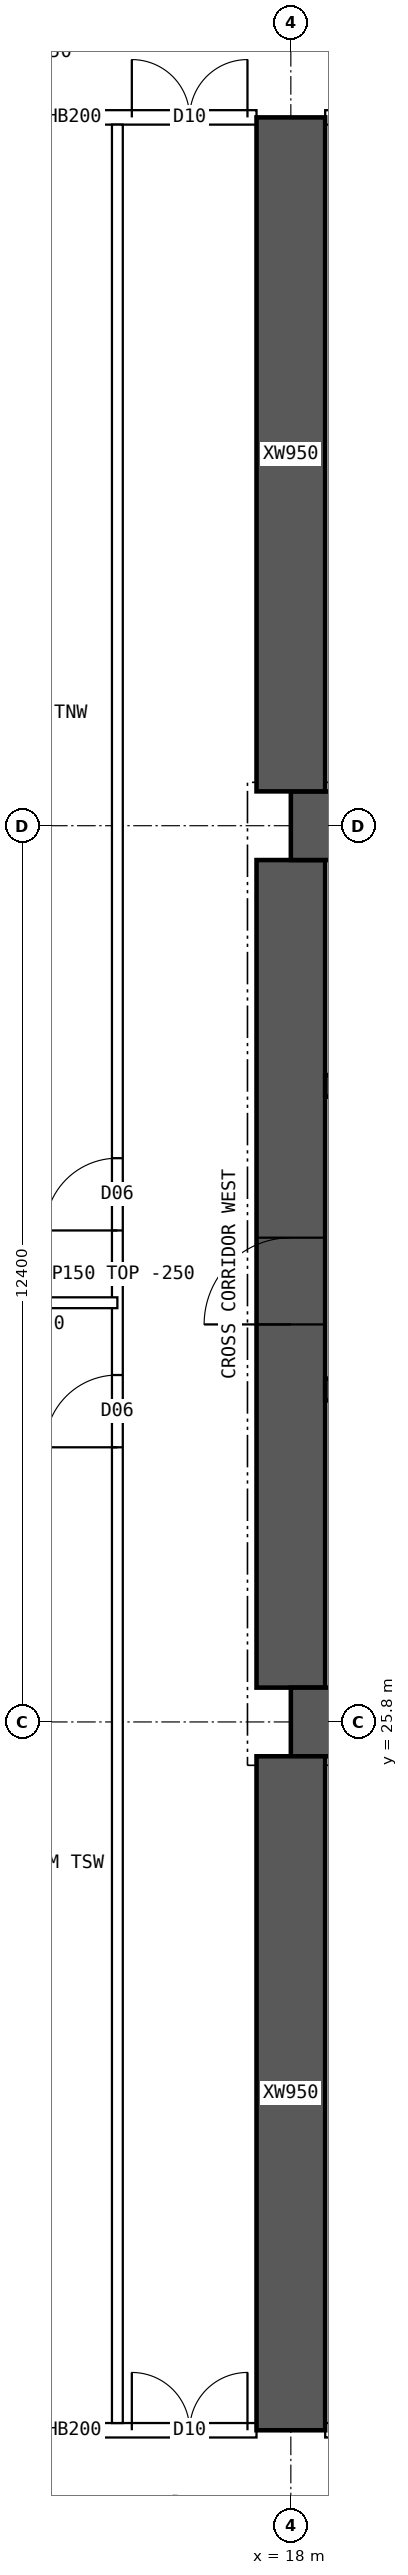
"""IFC4 building model, lengths in metres.
Left out: names, types, materials, properties, quantities, classifications, styles, units other than length and angle.
Written with IfcOpenShell. Run it as: python <this file> out.ifc"""

import sys

from ifc_helpers import new_model, si_unit, direction, frame, frame_2d, origin, place, context, subcontext, project, spatial, rectangle, extrude, element, fill, save


model = new_model("IFC4")
c1 = context("Model", 3, precision=1e-05, world=origin(), true_north=direction((0.0, 1.0)))
c2 = subcontext(c1, "Body", "Model", "MODEL_VIEW")
j1 = project(units=[si_unit("LENGTHUNIT", "METRE"), si_unit("PLANEANGLEUNIT", "RADIAN")], contexts=[c1])
p1 = place(None, origin())
s1 = spatial("IfcSite", under=j1, at=p1, CompositionType="ELEMENT")
p2 = place(p1, origin())
s2 = spatial("IfcBuilding", under=s1, at=p2, CompositionType="ELEMENT")
p3 = place(p2, frame((0.0, 0.0, 121.9)))
s3 = spatial("IfcBuildingStorey", under=s2, at=p3, CompositionType="ELEMENT", Elevation=121.9)
for number, where, z_axis, x_axis in (
    (1, (18.0, 25.8, 0.0), (0.0, 0.0, 1.0), (1.0, 0.0, 0.0)),
    (2, (18.0, 38.2, 0.0), (0.0, 0.0, 1.0), (1.0, 0.0, 0.0)),
):
    element("IfcWall", number, at=place(p3, frame(where, z_axis=z_axis, x_axis=x_axis)), inside=s3, PredefinedType="SHEAR", context=c2, shape_type="SweptSolid", body=[
        extrude(rectangle(XDim=48.0, YDim=0.95, at=frame_2d((24.0, 0.0))), origin(), (0.0, 0.0, 1.0), 3.75),
    ])
p4 = place(p3, frame((18.0, 26.275, 0.0), z_axis=(0.0, 0.0, 1.0), x_axis=(0.0, 1.0, 0.0)))
e3 = element("IfcWall", 3, at=p4, inside=s3, PredefinedType="SHEAR", context=c2, shape_type="SweptSolid", body=[
    extrude(rectangle(XDim=11.45, YDim=0.95, at=frame_2d((5.725, 0.0))), origin(), (0.0, 0.0, 1.0), 3.75),
])
p5 = place(p4, frame((5.025, 0.0, 0.0)))
e4 = element("IfcOpeningElement", 4, at=p5, cuts=e3, PredefinedType="OPENING", context=c2, shape_type="SweptSolid", body=[
    extrude(rectangle(XDim=1.2, YDim=2.1, at=frame_2d((0.6, 1.05))), frame((0.0, 0.485, 0.0), z_axis=(0.0, -1.0, 0.0), x_axis=(1.0, 0.0, 0.0)), (0.0, 0.0, 1.0), 0.97),
])
p6 = place(p3, frame((18.475, 30.4, 0.0), z_axis=(0.0, 0.0, 1.0), x_axis=(1.0, 0.0, 0.0)))
e5 = element("IfcWall", 5, at=p6, inside=s3, PredefinedType="SHEAR", context=c2, shape_type="SweptSolid", body=[
    extrude(rectangle(XDim=47.05, YDim=0.3, at=frame_2d((23.525, 0.0))), origin(), (0.0, 0.0, 1.0), 3.75),
])
p7 = place(p6, frame((0.4, 0.0, 0.0)))
e6 = element("IfcOpeningElement", 6, at=p7, cuts=e5, PredefinedType="OPENING", context=c2, shape_type="SweptSolid", body=[
    extrude(rectangle(XDim=1.0, YDim=2.1, at=frame_2d((0.5, 1.05))), frame((0.0, 0.16, 0.0), z_axis=(0.0, -1.0, 0.0), x_axis=(1.0, 0.0, 0.0)), (0.0, 0.0, 1.0), 0.32),
])
p8 = place(p6, frame((45.65, 0.0, 0.0)))
e7 = element("IfcOpeningElement", 7, at=p8, cuts=e5, PredefinedType="OPENING", context=c2, shape_type="SweptSolid", body=[
    extrude(rectangle(XDim=1.0, YDim=2.1, at=frame_2d((0.5, 1.05))), frame((0.0, 0.16, 0.0), z_axis=(0.0, -1.0, 0.0), x_axis=(1.0, 0.0, 0.0)), (0.0, 0.0, 1.0), 0.32),
])
p9 = place(p6, frame((8.275, 0.0, 0.0)))
e8 = element("IfcOpeningElement", 8, at=p9, cuts=e5, PredefinedType="OPENING", context=c2, shape_type="SweptSolid", body=[
    extrude(rectangle(XDim=1.1, YDim=2.1, at=frame_2d((0.55, 1.05))), frame((0.0, 0.16, 0.0), z_axis=(0.0, -1.0, 0.0), x_axis=(1.0, 0.0, 0.0)), (0.0, 0.0, 1.0), 0.32),
])
p10 = place(p6, frame((10.875, 0.0, 0.0)))
e9 = element("IfcOpeningElement", 9, at=p10, cuts=e5, PredefinedType="OPENING", context=c2, shape_type="SweptSolid", body=[
    extrude(rectangle(XDim=1.1, YDim=2.1, at=frame_2d((0.55, 1.05))), frame((0.0, 0.16, 0.0), z_axis=(0.0, -1.0, 0.0), x_axis=(1.0, 0.0, 0.0)), (0.0, 0.0, 1.0), 0.32),
])
p11 = place(p6, frame((13.475, 0.0, 0.0)))
e10 = element("IfcOpeningElement", 10, at=p11, cuts=e5, PredefinedType="OPENING", context=c2, shape_type="SweptSolid", body=[
    extrude(rectangle(XDim=1.1, YDim=2.1, at=frame_2d((0.55, 1.05))), frame((0.0, 0.16, 0.0), z_axis=(0.0, -1.0, 0.0), x_axis=(1.0, 0.0, 0.0)), (0.0, 0.0, 1.0), 0.32),
])
p12 = place(p6, frame((16.075, 0.0, 0.0)))
e11 = element("IfcOpeningElement", 11, at=p12, cuts=e5, PredefinedType="OPENING", context=c2, shape_type="SweptSolid", body=[
    extrude(rectangle(XDim=1.1, YDim=2.1, at=frame_2d((0.55, 1.05))), frame((0.0, 0.16, 0.0), z_axis=(0.0, -1.0, 0.0), x_axis=(1.0, 0.0, 0.0)), (0.0, 0.0, 1.0), 0.32),
])
p13 = place(p6, frame((18.85, 0.0, 0.0)))
e12 = element("IfcOpeningElement", 12, at=p13, cuts=e5, PredefinedType="OPENING", context=c2, shape_type="SweptSolid", body=[
    extrude(rectangle(XDim=0.9, YDim=2.1, at=frame_2d((0.45, 1.05))), frame((0.0, 0.16, 0.0), z_axis=(0.0, -1.0, 0.0), x_axis=(1.0, 0.0, 0.0)), (0.0, 0.0, 1.0), 0.32),
])
p14 = place(p6, frame((30.142, 0.0, 0.0)))
e13 = element("IfcOpeningElement", 13, at=p14, cuts=e5, PredefinedType="OPENING", context=c2, shape_type="SweptSolid", body=[
    extrude(rectangle(XDim=1.1, YDim=2.1, at=frame_2d((0.55, 1.05))), frame((0.0, 0.16, 0.0), z_axis=(0.0, -1.0, 0.0), x_axis=(1.0, 0.0, 0.0)), (0.0, 0.0, 1.0), 0.32),
])
p15 = place(p6, frame((33.675, 0.0, 0.0)))
e14 = element("IfcOpeningElement", 14, at=p15, cuts=e5, PredefinedType="OPENING", context=c2, shape_type="SweptSolid", body=[
    extrude(rectangle(XDim=1.1, YDim=2.1, at=frame_2d((0.55, 1.05))), frame((0.0, 0.16, 0.0), z_axis=(0.0, -1.0, 0.0), x_axis=(1.0, 0.0, 0.0)), (0.0, 0.0, 1.0), 0.32),
])
p16 = place(p6, frame((37.208, 0.0, 0.0)))
e15 = element("IfcOpeningElement", 15, at=p16, cuts=e5, PredefinedType="OPENING", context=c2, shape_type="SweptSolid", body=[
    extrude(rectangle(XDim=1.1, YDim=2.1, at=frame_2d((0.55, 1.05))), frame((0.0, 0.16, 0.0), z_axis=(0.0, -1.0, 0.0), x_axis=(1.0, 0.0, 0.0)), (0.0, 0.0, 1.0), 0.32),
])
p17 = place(p3, frame((18.475, 34.6, 0.0), z_axis=(0.0, 0.0, 1.0), x_axis=(1.0, 0.0, 0.0)))
e16 = element("IfcWall", 16, at=p17, inside=s3, PredefinedType="SHEAR", context=c2, shape_type="SweptSolid", body=[
    extrude(rectangle(XDim=47.05, YDim=0.3, at=frame_2d((23.525, 0.0))), origin(), (0.0, 0.0, 1.0), 3.75),
])
p18 = place(p17, frame((0.9, 0.0, 0.0)))
e17 = element("IfcOpeningElement", 17, at=p18, cuts=e16, PredefinedType="OPENING", context=c2, shape_type="SweptSolid", body=[
    extrude(rectangle(XDim=1.1, YDim=2.1, at=frame_2d((0.55, 1.05))), frame((0.0, 0.16, 0.0), z_axis=(0.0, -1.0, 0.0), x_axis=(1.0, 0.0, 0.0)), (0.0, 0.0, 1.0), 0.32),
])
p19 = place(p17, frame((45.05, 0.0, 0.0)))
e18 = element("IfcOpeningElement", 18, at=p19, cuts=e16, PredefinedType="OPENING", context=c2, shape_type="SweptSolid", body=[
    extrude(rectangle(XDim=1.1, YDim=2.1, at=frame_2d((0.55, 1.05))), frame((0.0, 0.16, 0.0), z_axis=(0.0, -1.0, 0.0), x_axis=(1.0, 0.0, 0.0)), (0.0, 0.0, 1.0), 0.32),
])
p20 = place(p17, frame((4.125, 0.0, 0.0)))
e19 = element("IfcOpeningElement", 19, at=p20, cuts=e16, PredefinedType="OPENING", context=c2, shape_type="SweptSolid", body=[
    extrude(rectangle(XDim=0.9, YDim=2.1, at=frame_2d((0.45, 1.05))), frame((0.0, 0.16, 0.0), z_axis=(0.0, -1.0, 0.0), x_axis=(1.0, 0.0, 0.0)), (0.0, 0.0, 1.0), 0.32),
])
p21 = place(p17, frame((42.025, 0.0, 0.0)))
e20 = element("IfcOpeningElement", 20, at=p21, cuts=e16, PredefinedType="OPENING", context=c2, shape_type="SweptSolid", body=[
    extrude(rectangle(XDim=0.9, YDim=2.1, at=frame_2d((0.45, 1.05))), frame((0.0, 0.16, 0.0), z_axis=(0.0, -1.0, 0.0), x_axis=(1.0, 0.0, 0.0)), (0.0, 0.0, 1.0), 0.32),
])
p22 = place(p17, frame((8.9, 0.0, 0.0)))
e21 = element("IfcOpeningElement", 21, at=p22, cuts=e16, PredefinedType="OPENING", context=c2, shape_type="SweptSolid", body=[
    extrude(rectangle(XDim=0.9, YDim=2.1, at=frame_2d((0.45, 1.05))), frame((0.0, 0.16, 0.0), z_axis=(0.0, -1.0, 0.0), x_axis=(1.0, 0.0, 0.0)), (0.0, 0.0, 1.0), 0.32),
])
p23 = place(p17, frame((12.874, 0.0, 0.0)))
e22 = element("IfcOpeningElement", 22, at=p23, cuts=e16, PredefinedType="OPENING", context=c2, shape_type="SweptSolid", body=[
    extrude(rectangle(XDim=0.9, YDim=2.1, at=frame_2d((0.45, 1.05))), frame((0.0, 0.16, 0.0), z_axis=(0.0, -1.0, 0.0), x_axis=(1.0, 0.0, 0.0)), (0.0, 0.0, 1.0), 0.32),
])
p24 = place(p17, frame((16.521, 0.0, 0.0)))
e23 = element("IfcOpeningElement", 23, at=p24, cuts=e16, PredefinedType="OPENING", context=c2, shape_type="SweptSolid", body=[
    extrude(rectangle(XDim=0.9, YDim=2.1, at=frame_2d((0.45, 1.05))), frame((0.0, 0.16, 0.0), z_axis=(0.0, -1.0, 0.0), x_axis=(1.0, 0.0, 0.0)), (0.0, 0.0, 1.0), 0.32),
])
p25 = place(p17, frame((20.28, 0.0, 0.0)))
e24 = element("IfcOpeningElement", 24, at=p25, cuts=e16, PredefinedType="OPENING", context=c2, shape_type="SweptSolid", body=[
    extrude(rectangle(XDim=0.9, YDim=2.1, at=frame_2d((0.45, 1.05))), frame((0.0, 0.16, 0.0), z_axis=(0.0, -1.0, 0.0), x_axis=(1.0, 0.0, 0.0)), (0.0, 0.0, 1.0), 0.32),
])
p26 = place(p17, frame((24.686, 0.0, 0.0)))
e25 = element("IfcOpeningElement", 25, at=p26, cuts=e16, PredefinedType="OPENING", context=c2, shape_type="SweptSolid", body=[
    extrude(rectangle(XDim=0.9, YDim=2.1, at=frame_2d((0.45, 1.05))), frame((0.0, 0.16, 0.0), z_axis=(0.0, -1.0, 0.0), x_axis=(1.0, 0.0, 0.0)), (0.0, 0.0, 1.0), 0.32),
])
p27 = place(p17, frame((27.483, 0.0, 0.0)))
e26 = element("IfcOpeningElement", 26, at=p27, cuts=e16, PredefinedType="OPENING", context=c2, shape_type="SweptSolid", body=[
    extrude(rectangle(XDim=0.9, YDim=2.1, at=frame_2d((0.45, 1.05))), frame((0.0, 0.16, 0.0), z_axis=(0.0, -1.0, 0.0), x_axis=(1.0, 0.0, 0.0)), (0.0, 0.0, 1.0), 0.32),
])
p28 = place(p17, frame((29.45, 0.0, 0.0)))
e27 = element("IfcOpeningElement", 27, at=p28, cuts=e16, PredefinedType="OPENING", context=c2, shape_type="SweptSolid", body=[
    extrude(rectangle(XDim=0.9, YDim=2.1, at=frame_2d((0.45, 1.05))), frame((0.0, 0.16, 0.0), z_axis=(0.0, -1.0, 0.0), x_axis=(1.0, 0.0, 0.0)), (0.0, 0.0, 1.0), 0.32),
])
p29 = place(p17, frame((31.882, 0.0, 0.0)))
e28 = element("IfcOpeningElement", 28, at=p29, cuts=e16, PredefinedType="OPENING", context=c2, shape_type="SweptSolid", body=[
    extrude(rectangle(XDim=0.9, YDim=2.1, at=frame_2d((0.45, 1.05))), frame((0.0, 0.16, 0.0), z_axis=(0.0, -1.0, 0.0), x_axis=(1.0, 0.0, 0.0)), (0.0, 0.0, 1.0), 0.32),
])
p30 = place(p17, frame((34.617, 0.0, 0.0)))
e29 = element("IfcOpeningElement", 29, at=p30, cuts=e16, PredefinedType="OPENING", context=c2, shape_type="SweptSolid", body=[
    extrude(rectangle(XDim=0.9, YDim=2.1, at=frame_2d((0.45, 1.05))), frame((0.0, 0.16, 0.0), z_axis=(0.0, -1.0, 0.0), x_axis=(1.0, 0.0, 0.0)), (0.0, 0.0, 1.0), 0.32),
])
p31 = place(p17, frame((37.656, 0.0, 0.0)))
e30 = element("IfcOpeningElement", 30, at=p31, cuts=e16, PredefinedType="OPENING", context=c2, shape_type="SweptSolid", body=[
    extrude(rectangle(XDim=0.9, YDim=2.1, at=frame_2d((0.45, 1.05))), frame((0.0, 0.16, 0.0), z_axis=(0.0, -1.0, 0.0), x_axis=(1.0, 0.0, 0.0)), (0.0, 0.0, 1.0), 0.32),
])
for number, where, z_axis, x_axis in (
    (31, (18.0, 16.0, 0.0), (0.0, 0.0, 1.0), (0.0, 1.0, 0.0)),
    (32, (18.0, 38.675, 0.0), (0.0, 0.0, 1.0), (0.0, 1.0, 0.0)),
):
    element("IfcWall", number, at=place(p3, frame(where, z_axis=z_axis, x_axis=x_axis)), inside=s3, PredefinedType="SHEAR", context=c2, shape_type="SweptSolid", body=[
        extrude(rectangle(XDim=9.325, YDim=0.95, at=frame_2d((4.663, 0.0))), origin(), (0.0, 0.0, 1.0), 3.75),
    ])
p32 = place(p3, frame((12.475, 16.0, 0.0), z_axis=(0.0, 0.0, 1.0), x_axis=(1.0, 0.0, 0.0)))
e33 = element("IfcWall", 33, at=p32, inside=s3, PredefinedType="SOLIDWALL", context=c2, shape_type="SweptSolid", body=[
    extrude(rectangle(XDim=5.05, YDim=0.2, at=frame_2d((2.525, 0.0))), origin(), (0.0, 0.0, 1.0), 3.5),
])
p33 = place(p32, frame((3.325, 0.0, 0.0)))
e34 = element("IfcOpeningElement", 34, at=p33, cuts=e33, PredefinedType="OPENING", context=c2, shape_type="SweptSolid", body=[
    extrude(rectangle(XDim=1.6, YDim=2.1, at=frame_2d((0.8, 1.05))), frame((0.0, 0.11, 0.0), z_axis=(0.0, -1.0, 0.0), x_axis=(1.0, 0.0, 0.0)), (0.0, 0.0, 1.0), 0.22),
])
p34 = place(p3, frame((18.475, 16.0, 0.0), z_axis=(0.0, 0.0, 1.0), x_axis=(1.0, 0.0, 0.0)))
e35 = element("IfcWall", 35, at=p34, inside=s3, PredefinedType="SOLIDWALL", context=c2, shape_type="SweptSolid", body=[
    extrude(rectangle(XDim=5.05, YDim=0.2, at=frame_2d((2.525, 0.0))), origin(), (0.0, 0.0, 1.0), 3.5),
])
p35 = place(p34, frame((0.35, 0.0, 0.0)))
e36 = element("IfcOpeningElement", 36, at=p35, cuts=e35, PredefinedType="OPENING", context=c2, shape_type="SweptSolid", body=[
    extrude(rectangle(XDim=0.9, YDim=2.1, at=frame_2d((0.45, 1.05))), frame((0.0, 0.11, 0.0), z_axis=(0.0, -1.0, 0.0), x_axis=(1.0, 0.0, 0.0)), (0.0, 0.0, 1.0), 0.22),
])
p36 = place(p34, frame((3.105, 0.0, 0.0)))
e37 = element("IfcOpeningElement", 37, at=p36, cuts=e35, PredefinedType="OPENING", context=c2, shape_type="SweptSolid", body=[
    extrude(rectangle(XDim=0.9, YDim=2.1, at=frame_2d((0.45, 1.05))), frame((0.0, 0.11, 0.0), z_axis=(0.0, -1.0, 0.0), x_axis=(1.0, 0.0, 0.0)), (0.0, 0.0, 1.0), 0.22),
])
p37 = place(p3, frame((12.475, 48.0, 0.0), z_axis=(0.0, 0.0, 1.0), x_axis=(1.0, 0.0, 0.0)))
e38 = element("IfcWall", 38, at=p37, inside=s3, PredefinedType="SOLIDWALL", context=c2, shape_type="SweptSolid", body=[
    extrude(rectangle(XDim=5.05, YDim=0.2, at=frame_2d((2.525, 0.0))), origin(), (0.0, 0.0, 1.0), 3.5),
])
p38 = place(p37, frame((3.325, 0.0, 0.0)))
e39 = element("IfcOpeningElement", 39, at=p38, cuts=e38, PredefinedType="OPENING", context=c2, shape_type="SweptSolid", body=[
    extrude(rectangle(XDim=1.6, YDim=2.1, at=frame_2d((0.8, 1.05))), frame((0.0, 0.11, 0.0), z_axis=(0.0, -1.0, 0.0), x_axis=(1.0, 0.0, 0.0)), (0.0, 0.0, 1.0), 0.22),
])
p39 = place(p3, frame((18.475, 48.0, 0.0), z_axis=(0.0, 0.0, 1.0), x_axis=(1.0, 0.0, 0.0)))
e40 = element("IfcWall", 40, at=p39, inside=s3, PredefinedType="SOLIDWALL", context=c2, shape_type="SweptSolid", body=[
    extrude(rectangle(XDim=5.05, YDim=0.2, at=frame_2d((2.525, 0.0))), origin(), (0.0, 0.0, 1.0), 3.5),
])
p40 = place(p39, frame((0.35, 0.0, 0.0)))
e41 = element("IfcOpeningElement", 41, at=p40, cuts=e40, PredefinedType="OPENING", context=c2, shape_type="SweptSolid", body=[
    extrude(rectangle(XDim=0.9, YDim=2.1, at=frame_2d((0.45, 1.05))), frame((0.0, 0.11, 0.0), z_axis=(0.0, -1.0, 0.0), x_axis=(1.0, 0.0, 0.0)), (0.0, 0.0, 1.0), 0.22),
])
p41 = place(p39, frame((2.735, 0.0, 0.0)))
e42 = element("IfcOpeningElement", 42, at=p41, cuts=e40, PredefinedType="OPENING", context=c2, shape_type="SweptSolid", body=[
    extrude(rectangle(XDim=0.9, YDim=2.1, at=frame_2d((0.45, 1.05))), frame((0.0, 0.11, 0.0), z_axis=(0.0, -1.0, 0.0), x_axis=(1.0, 0.0, 0.0)), (0.0, 0.0, 1.0), 0.22),
])
p42 = place(p3, frame((15.6, 16.1, 0.0), z_axis=(0.0, 0.0, 1.0), x_axis=(0.0, 1.0, 0.0)))
e43 = element("IfcWall", 43, at=p42, inside=s3, PredefinedType="PARTITIONING", context=c2, shape_type="SweptSolid", body=[
    extrude(rectangle(XDim=31.8, YDim=0.15, at=frame_2d((15.9, 0.0))), origin(), (0.0, 0.0, 1.0), 3.5),
])
p43 = place(p42, frame((13.5, 0.0, 0.0)))
e44 = element("IfcOpeningElement", 44, at=p43, cuts=e43, PredefinedType="OPENING", context=c2, shape_type="SweptSolid", body=[
    extrude(rectangle(XDim=1.0, YDim=2.1, at=frame_2d((0.5, 1.05))), frame((0.0, 0.085, 0.0), z_axis=(0.0, -1.0, 0.0), x_axis=(1.0, 0.0, 0.0)), (0.0, 0.0, 1.0), 0.17),
])
p44 = place(p42, frame((16.5, 0.0, 0.0)))
e45 = element("IfcOpeningElement", 45, at=p44, cuts=e43, PredefinedType="OPENING", context=c2, shape_type="SweptSolid", body=[
    extrude(rectangle(XDim=1.0, YDim=2.1, at=frame_2d((0.5, 1.05))), frame((0.0, 0.085, 0.0), z_axis=(0.0, -1.0, 0.0), x_axis=(1.0, 0.0, 0.0)), (0.0, 0.0, 1.0), 0.17),
])
p45 = place(p3, frame((12.0, 31.6, 0.0), z_axis=(0.0, 0.0, 1.0), x_axis=(1.0, 0.0, 0.0)))
e46 = element("IfcWall", 46, at=p45, inside=s3, PredefinedType="PARTITIONING", context=c2, shape_type="SweptSolid", body=[
    extrude(rectangle(XDim=3.6, YDim=0.15, at=frame_2d((1.8, 0.0))), origin(), (0.0, 0.0, 1.0), 3.5),
])
p46 = place(p5, origin())
e47 = element("IfcDoor", 47, at=p46, inside=s3, OperationType="SINGLE_SWING_LEFT", PredefinedType="DOOR", context=c2, shape_type="SweptSolid", body=[
    extrude(rectangle(XDim=1.2, YDim=2.1, at=frame_2d((0.6, 1.05))), frame((0.0, 0.025, 0.0), z_axis=(0.0, -1.0, 0.0), x_axis=(1.0, 0.0, 0.0)), (0.0, 0.0, 1.0), 0.05),
])
fill(e4, e47)
p47 = place(p33, origin())
e48 = element("IfcDoor", 48, at=p47, inside=s3, OperationType="DOUBLE_DOOR_SINGLE_SWING", PredefinedType="DOOR", context=c2, shape_type="SweptSolid", body=[
    extrude(rectangle(XDim=1.6, YDim=2.1, at=frame_2d((0.8, 1.05))), frame((0.0, 0.025, 0.0), z_axis=(0.0, -1.0, 0.0), x_axis=(1.0, 0.0, 0.0)), (0.0, 0.0, 1.0), 0.05),
])
fill(e34, e48)
p48 = place(p38, origin())
e49 = element("IfcDoor", 49, at=p48, inside=s3, OperationType="DOUBLE_DOOR_SINGLE_SWING", PredefinedType="DOOR", context=c2, shape_type="SweptSolid", body=[
    extrude(rectangle(XDim=1.6, YDim=2.1, at=frame_2d((0.8, 1.05))), frame((0.0, 0.025, 0.0), z_axis=(0.0, -1.0, 0.0), x_axis=(1.0, 0.0, 0.0)), (0.0, 0.0, 1.0), 0.05),
])
fill(e39, e49)
p49 = place(p43, origin())
e50 = element("IfcDoor", 50, at=p49, inside=s3, OperationType="SINGLE_SWING_LEFT", PredefinedType="DOOR", context=c2, shape_type="SweptSolid", body=[
    extrude(rectangle(XDim=1.0, YDim=2.1, at=frame_2d((0.5, 1.05))), frame((0.0, 0.025, 0.0), z_axis=(0.0, -1.0, 0.0), x_axis=(1.0, 0.0, 0.0)), (0.0, 0.0, 1.0), 0.05),
])
fill(e44, e50)
p50 = place(p44, origin())
e51 = element("IfcDoor", 51, at=p50, inside=s3, OperationType="SINGLE_SWING_LEFT", PredefinedType="DOOR", context=c2, shape_type="SweptSolid", body=[
    extrude(rectangle(XDim=1.0, YDim=2.1, at=frame_2d((0.5, 1.05))), frame((0.0, 0.025, 0.0), z_axis=(0.0, -1.0, 0.0), x_axis=(1.0, 0.0, 0.0)), (0.0, 0.0, 1.0), 0.05),
])
fill(e45, e51)
save(model, sys.argv[1])
